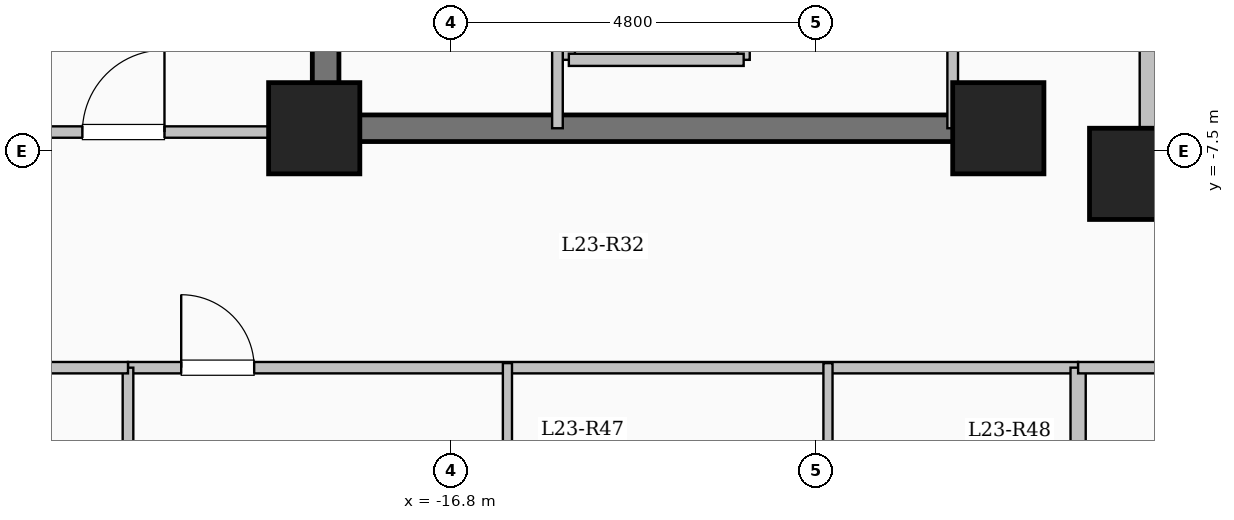
"""IFC4 building model, lengths in metres.
Left out: names, types, materials, properties, quantities, classifications, styles, units other than length and angle.
Written with IfcOpenShell. Run it as: python <this file> out.ifc"""

import sys

from ifc_helpers import new_model, si_unit, direction, frame, frame_2d, origin, origin_2d, place, context, subcontext, project, spatial, rectangle, extrude, element, fill, save


model = new_model("IFC4")
c1 = context("Model", 3, precision=1e-05, world=origin(), true_north=direction((0.0, 1.0)))
c2 = subcontext(c1, "Body", "Model", "MODEL_VIEW")
j1 = project(units=[si_unit("LENGTHUNIT", "METRE"), si_unit("PLANEANGLEUNIT", "RADIAN")], contexts=[c1])
p1 = place(None, origin())
s1 = spatial("IfcSite", under=j1, at=p1, CompositionType="ELEMENT")
p2 = place(p1, origin())
s2 = spatial("IfcBuilding", under=s1, at=p2, CompositionType="ELEMENT")
p3 = place(p2, frame((0.0, 0.0, 88.35)))
s3 = spatial("IfcBuildingStorey", under=s2, at=p3, CompositionType="ELEMENT", Elevation=88.35)
for number, where, z_axis, x_axis in (
    (1, (-7.8, -7.8, 0.0), (0.0, 0.0, 1.0), (1.0, 0.0, 0.0)),
    (2, (-9.6, -7.2, 0.0), (0.0, 0.0, 1.0), (1.0, 0.0, 0.0)),
    (3, (-18.6, -7.2, 0.0), (0.0, 0.0, 1.0), (1.0, 0.0, 0.0)),
):
    element("IfcColumn", number, at=place(p3, frame(where, z_axis=z_axis, x_axis=x_axis)), inside=s3, PredefinedType="COLUMN", context=c2, shape_type="SweptSolid", body=[
        extrude(rectangle(XDim=1.2, YDim=1.2, at=origin_2d()), origin(), (0.0, 0.0, 1.0), 3.35),
    ])
p4 = place(p3, frame((-7.62, -7.62, 0.0), z_axis=(0.0, 0.0, 1.0), x_axis=(1.0, 0.0, 0.0)))
e4 = element("IfcWall", 4, at=p4, inside=s3, PredefinedType="SOLIDWALL", context=c2, shape_type="SweptSolid", body=[
    extrude(rectangle(XDim=15.24, YDim=0.24, at=frame_2d((7.62, 0.0))), origin(), (0.0, 0.0, 1.0), 3.1),
])
p5 = place(p4, frame((6.92, 0.0, 0.95)))
e5 = element("IfcOpeningElement", 5, at=p5, cuts=e4, PredefinedType="OPENING", context=c2, shape_type="SweptSolid", body=[
    extrude(rectangle(XDim=1.4, YDim=1.5, at=frame_2d((0.7, 0.75))), frame((0.0, 0.13, 0.0), z_axis=(0.0, -1.0, 0.0), x_axis=(1.0, 0.0, 0.0)), (0.0, 0.0, 1.0), 0.26),
])
p6 = place(p3, frame((-7.62, 7.62, 0.0), z_axis=(0.0, 0.0, 1.0), x_axis=(0.0, -1.0, 0.0)))
e6 = element("IfcWall", 6, at=p6, inside=s3, PredefinedType="SOLIDWALL", context=c2, shape_type="SweptSolid", body=[
    extrude(rectangle(XDim=15.24, YDim=0.24, at=frame_2d((7.62, 0.0))), origin(), (0.0, 0.0, 1.0), 3.1),
])
p7 = place(p6, frame((6.92, 0.0, 0.95)))
e7 = element("IfcOpeningElement", 7, at=p7, cuts=e6, PredefinedType="OPENING", context=c2, shape_type="SweptSolid", body=[
    extrude(rectangle(XDim=1.4, YDim=1.5, at=frame_2d((0.7, 0.75))), frame((0.0, 0.13, 0.0), z_axis=(0.0, -1.0, 0.0), x_axis=(1.0, 0.0, 0.0)), (0.0, 0.0, 1.0), 0.26),
])
for number, where, z_axis, x_axis in (
    (8, (-15.25, -6.3, 0.0), (0.0, 0.0, 1.0), (0.0, 1.0, 0.0)),
    (9, (-12.95, -6.3, 0.0), (0.0, 0.0, 1.0), (0.0, 1.0, 0.0)),
):
    element("IfcWall", number, at=place(p3, frame(where, z_axis=z_axis, x_axis=x_axis)), inside=s3, PredefinedType="SOLIDWALL", context=c2, shape_type="SweptSolid", body=[
        extrude(rectangle(XDim=2.6, YDim=0.16, at=frame_2d((1.3, 0.0))), origin(), (0.0, 0.0, 1.0), 3.1),
    ])
p8 = place(p3, frame((-15.25, -6.3, 0.0), z_axis=(0.0, 0.0, 1.0), x_axis=(1.0, 0.0, 0.0)))
e10 = element("IfcWall", 10, at=p8, inside=s3, PredefinedType="SOLIDWALL", context=c2, shape_type="SweptSolid", body=[
    extrude(rectangle(XDim=2.3, YDim=0.16, at=frame_2d((1.15, 0.0))), origin(), (0.0, 0.0, 1.0), 3.1),
])
p9 = place(p3, frame((-18.45, -7.375, 0.0), z_axis=(0.0, 0.0, 1.0), x_axis=(0.0, 1.0, 0.0)))
e11 = element("IfcWall", 11, at=p9, inside=s3, PredefinedType="SHEAR", context=c2, shape_type="SweptSolid", body=[
    extrude(rectangle(XDim=14.05, YDim=0.35, at=frame_2d((7.025, 0.0))), origin(), (0.0, 0.0, 1.0), 3.35),
])
p10 = place(p3, frame((-18.625, -7.2, 0.0), z_axis=(0.0, 0.0, 1.0), x_axis=(1.0, 0.0, 0.0)))
e12 = element("IfcWall", 12, at=p10, inside=s3, PredefinedType="SHEAR", context=c2, shape_type="SweptSolid", body=[
    extrude(rectangle(XDim=8.55, YDim=0.35, at=frame_2d((4.275, 0.0))), origin(), (0.0, 0.0, 1.0), 3.35),
])
p11 = place(p3, frame((-15.4, -7.2, 0.0), z_axis=(0.0, 0.0, 1.0), x_axis=(0.0, 1.0, 0.0)))
e13 = element("IfcWall", 13, at=p11, inside=s3, PredefinedType="PARTITIONING", context=c2, shape_type="SweptSolid", body=[
    extrude(rectangle(XDim=10.45, YDim=0.14, at=frame_2d((5.225, 0.0))), origin(), (0.0, 0.0, 1.0), 3.1),
])
p12 = place(p11, frame((9.25, 0.0, 0.0)))
e14 = element("IfcOpeningElement", 14, at=p12, cuts=e13, PredefinedType="OPENING", context=c2, shape_type="SweptSolid", body=[
    extrude(rectangle(XDim=0.9, YDim=2.08, at=frame_2d((0.45, 1.04))), frame((0.0, 0.08, 0.0), z_axis=(0.0, -1.0, 0.0), x_axis=(1.0, 0.0, 0.0)), (0.0, 0.0, 1.0), 0.16),
])
p13 = place(p3, frame((-10.2, -7.2, 0.0), z_axis=(0.0, 0.0, 1.0), x_axis=(0.0, 1.0, 0.0)))
e15 = element("IfcWall", 15, at=p13, inside=s3, PredefinedType="PARTITIONING", context=c2, shape_type="SweptSolid", body=[
    extrude(rectangle(XDim=9.12, YDim=0.14, at=frame_2d((4.56, 0.0))), origin(), (0.0, 0.0, 1.0), 3.1),
])
p14 = place(p13, frame((1.9, 0.0, 0.0)))
e16 = element("IfcOpeningElement", 16, at=p14, cuts=e15, PredefinedType="OPENING", context=c2, shape_type="SweptSolid", body=[
    extrude(rectangle(XDim=0.95, YDim=2.12, at=frame_2d((0.475, 1.06))), frame((0.0, 0.08, 0.0), z_axis=(0.0, -1.0, 0.0), x_axis=(1.0, 0.0, 0.0)), (0.0, 0.0, 1.0), 0.16),
])
p15 = place(p13, frame((7.75, 0.0, 0.0)))
e17 = element("IfcOpeningElement", 17, at=p15, cuts=e15, PredefinedType="OPENING", context=c2, shape_type="SweptSolid", body=[
    extrude(rectangle(XDim=0.95, YDim=2.12, at=frame_2d((0.475, 1.06))), frame((0.0, 0.08, 0.0), z_axis=(0.0, -1.0, 0.0), x_axis=(1.0, 0.0, 0.0)), (0.0, 0.0, 1.0), 0.16),
])
p16 = place(p3, frame((-21.05, -10.35, 0.0), z_axis=(0.0, 0.0, 1.0), x_axis=(1.0, 0.0, 0.0)))
e18 = element("IfcWall", 18, at=p16, inside=s3, PredefinedType="PARTITIONING", context=c2, shape_type="SweptSolid", body=[
    extrude(rectangle(XDim=12.5, YDim=0.15, at=frame_2d((6.25, 0.0))), origin(), (0.0, 0.0, 1.0), 3.1),
])
p17 = place(p16, frame((0.7, 0.0, 0.0)))
e19 = element("IfcOpeningElement", 19, at=p17, cuts=e18, PredefinedType="OPENING", context=c2, shape_type="SweptSolid", body=[
    extrude(rectangle(XDim=0.96, YDim=2.15, at=frame_2d((0.48, 1.075))), frame((0.0, 0.085, 0.0), z_axis=(0.0, -1.0, 0.0), x_axis=(1.0, 0.0, 0.0)), (0.0, 0.0, 1.0), 0.17),
])
p18 = place(p3, frame((-16.058, -22.1, 0.0), z_axis=(0.0, 0.0, 1.0), x_axis=(0.0, 1.0, 0.0)))
e20 = element("IfcWall", 20, at=p18, inside=s3, PredefinedType="PARTITIONING", context=c2, shape_type="SweptSolid", body=[
    extrude(rectangle(XDim=11.81, YDim=0.12, at=frame_2d((5.905, 0.0))), origin(), (0.0, 0.0, 1.0), 3.1),
])
p19 = place(p18, frame((7.645, 0.0, 0.0)))
e21 = element("IfcOpeningElement", 21, at=p19, cuts=e20, PredefinedType="OPENING", context=c2, shape_type="SweptSolid", body=[
    extrude(rectangle(XDim=1.08, YDim=2.15, at=frame_2d((0.54, 1.075))), frame((0.0, 0.07, 0.0), z_axis=(0.0, -1.0, 0.0), x_axis=(1.0, 0.0, 0.0)), (0.0, 0.0, 1.0), 0.14),
])
p20 = place(p3, frame((-11.841, -13.09, 0.0), z_axis=(0.0, 0.0, 1.0), x_axis=(0.0, 1.0, 0.0)))
e22 = element("IfcWall", 22, at=p20, inside=s3, PredefinedType="PARTITIONING", context=c2, shape_type="SweptSolid", body=[
    extrude(rectangle(XDim=2.8, YDim=0.12, at=frame_2d((1.4, 0.0))), origin(), (0.0, 0.0, 1.0), 3.1),
])
p21 = place(p3, frame((-8.55, -22.704, 0.0), z_axis=(0.0, 0.0, 1.0), x_axis=(0.0, 1.0, 0.0)))
e23 = element("IfcWall", 23, at=p21, inside=s3, PredefinedType="SOLIDWALL", context=c2, shape_type="SweptSolid", body=[
    extrude(rectangle(XDim=12.354, YDim=0.2, at=frame_2d((6.177, 0.0))), origin(), (0.0, 0.0, 1.0), 3.1),
])
p22 = place(p3, frame((-8.55, -10.35, 0.0), z_axis=(0.0, 0.0, 1.0), x_axis=(1.0, 0.0, 0.0)))
e24 = element("IfcWall", 24, at=p22, inside=s3, PredefinedType="PARTITIONING", context=c2, shape_type="SweptSolid", body=[
    extrude(rectangle(XDim=17.1, YDim=0.15, at=frame_2d((8.55, 0.0))), origin(), (0.0, 0.0, 1.0), 3.1),
])
p23 = place(p22, frame((1.15, 0.0, 0.0)))
e25 = element("IfcOpeningElement", 25, at=p23, cuts=e24, PredefinedType="OPENING", context=c2, shape_type="SweptSolid", body=[
    extrude(rectangle(XDim=0.96, YDim=2.15, at=frame_2d((0.48, 1.075))), frame((0.0, 0.085, 0.0), z_axis=(0.0, -1.0, 0.0), x_axis=(1.0, 0.0, 0.0)), (0.0, 0.0, 1.0), 0.17),
])
p24 = place(p22, frame((10.5, 0.0, 0.0)))
e26 = element("IfcOpeningElement", 26, at=p24, cuts=e24, PredefinedType="OPENING", context=c2, shape_type="SweptSolid", body=[
    extrude(rectangle(XDim=0.96, YDim=2.15, at=frame_2d((0.48, 1.075))), frame((0.0, 0.085, 0.0), z_axis=(0.0, -1.0, 0.0), x_axis=(1.0, 0.0, 0.0)), (0.0, 0.0, 1.0), 0.17),
])
p25 = place(p3, frame((-26.88, -7.25, 0.0), z_axis=(0.0, 0.0, 1.0), x_axis=(1.0, 0.0, 0.0)))
e27 = element("IfcWall", 27, at=p25, inside=s3, PredefinedType="PARTITIONING", context=c2, shape_type="SweptSolid", body=[
    extrude(rectangle(XDim=8.43, YDim=0.15, at=frame_2d((4.215, 0.0))), origin(), (0.0, 0.0, 1.0), 3.1),
])
p26 = place(p25, frame((5.23, 0.0, 0.0)))
e28 = element("IfcOpeningElement", 28, at=p26, cuts=e27, PredefinedType="OPENING", context=c2, shape_type="SweptSolid", body=[
    extrude(rectangle(XDim=1.08, YDim=2.15, at=frame_2d((0.54, 1.075))), frame((0.0, 0.085, 0.0), z_axis=(0.0, -1.0, 0.0), x_axis=(1.0, 0.0, 0.0)), (0.0, 0.0, 1.0), 0.17),
])
p27 = place(p3, frame((-21.05, -17.85, 0.0), z_axis=(0.0, 0.0, 1.0), x_axis=(0.0, 1.0, 0.0)))
e29 = element("IfcWall", 29, at=p27, inside=s3, PredefinedType="PARTITIONING", context=c2, shape_type="SweptSolid", body=[
    extrude(rectangle(XDim=7.5, YDim=0.14, at=frame_2d((3.75, 0.0))), origin(), (0.0, 0.0, 1.0), 3.1),
])
p28 = place(p3, frame((-26.88, -10.35, 0.0), z_axis=(0.0, 0.0, 1.0), x_axis=(1.0, 0.0, 0.0)))
e30 = element("IfcWall", 30, at=p28, inside=s3, PredefinedType="PARTITIONING", context=c2, shape_type="SweptSolid", body=[
    extrude(rectangle(XDim=5.83, YDim=0.15, at=frame_2d((2.915, 0.0))), origin(), (0.0, 0.0, 1.0), 3.1),
])
p29 = place(p28, frame((2.44, 0.0, 0.0)))
e31 = element("IfcOpeningElement", 31, at=p29, cuts=e30, PredefinedType="OPENING", context=c2, shape_type="SweptSolid", body=[
    extrude(rectangle(XDim=0.95, YDim=2.15, at=frame_2d((0.475, 1.075))), frame((0.0, 0.085, 0.0), z_axis=(0.0, -1.0, 0.0), x_axis=(1.0, 0.0, 0.0)), (0.0, 0.0, 1.0), 0.17),
])
p30 = place(p17, origin())
e32 = element("IfcDoor", 32, at=p30, inside=s3, OperationType="SINGLE_SWING_LEFT", PredefinedType="DOOR", context=c2, shape_type="SweptSolid", body=[
    extrude(rectangle(XDim=0.96, YDim=2.15, at=frame_2d((0.48, 1.075))), frame((0.0, 0.025, 0.0), z_axis=(0.0, -1.0, 0.0), x_axis=(1.0, 0.0, 0.0)), (0.0, 0.0, 1.0), 0.05),
])
fill(e19, e32)
p31 = place(p26, origin())
e33 = element("IfcDoor", 33, at=p31, inside=s3, OperationType="SINGLE_SWING_RIGHT", PredefinedType="DOOR", context=c2, shape_type="SweptSolid", body=[
    extrude(rectangle(XDim=1.08, YDim=2.15, at=frame_2d((0.54, 1.075))), frame((0.0, 0.025, 0.0), z_axis=(0.0, -1.0, 0.0), x_axis=(1.0, 0.0, 0.0)), (0.0, 0.0, 1.0), 0.05),
])
fill(e28, e33)
save(model, sys.argv[1])
